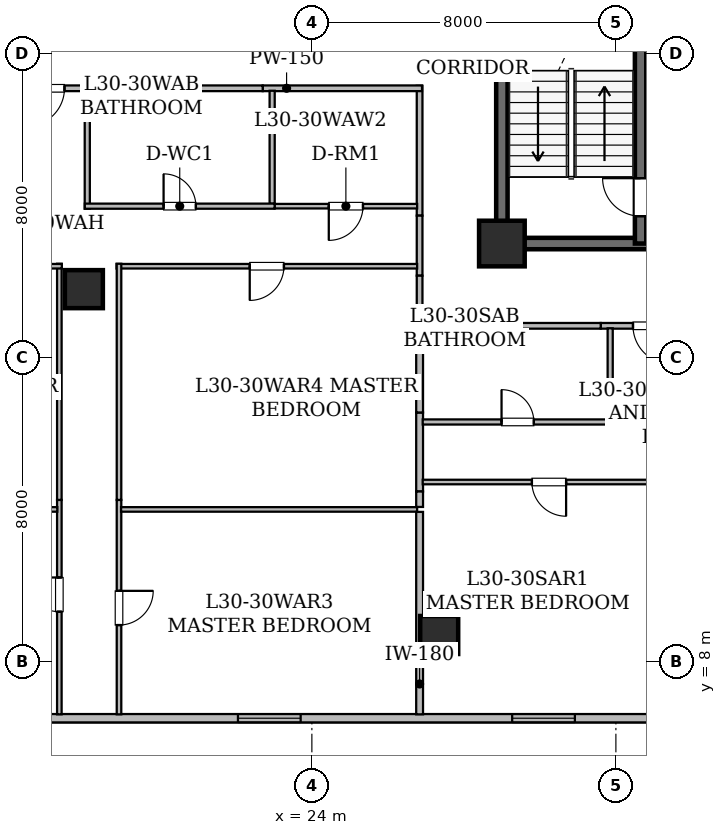
"""IFC4 building model, lengths in metres.
Left out: names, types, materials, properties, quantities, classifications, styles, units other than length and angle.
Written with IfcOpenShell. Run it as: python <this file> out.ifc"""

import sys

from ifc_helpers import new_model, si_unit, direction, frame, frame_2d, origin, origin_2d, place, context, subcontext, project, spatial, rectangle, hollow_rectangle, extrude, element, fill, save


model = new_model("IFC4")
c1 = context("Model", 3, precision=1e-05, world=origin(), true_north=direction((0.0, 1.0)))
c2 = subcontext(c1, "Body", "Model", "MODEL_VIEW")
j1 = project(units=[si_unit("LENGTHUNIT", "METRE"), si_unit("PLANEANGLEUNIT", "RADIAN")], contexts=[c1])
p1 = place(None, origin())
s1 = spatial("IfcSite", under=j1, at=p1, CompositionType="ELEMENT")
p2 = place(p1, origin())
s2 = spatial("IfcBuilding", under=s1, at=p2, CompositionType="ELEMENT")
p3 = place(p2, frame((0.0, 0.0, 120.15)))
s3 = spatial("IfcBuildingStorey", under=s2, at=p3, CompositionType="ELEMENT", Elevation=120.15)
p4 = place(p3, frame((29.0, 19.0, 0.0), z_axis=(0.0, 0.0, 1.0), x_axis=(1.0, 0.0, 0.0)))
e1 = element("IfcColumn", 1, at=p4, inside=s3, PredefinedType="COLUMN", context=c2, shape_type="SweptSolid", body=[
    extrude(hollow_rectangle(XDim=1.2, YDim=1.2, WallThickness=0.06, at=origin_2d()), origin(), (0.0, 0.0, 1.0), 3.65),
])
for number, where, z_axis, x_axis in (
    (2, (27.35, 8.7, 0.0), (0.0, 0.0, 1.0), (1.0, 0.0, 0.0)),
    (3, (18.0, 17.8, 0.0), (0.0, 0.0, 1.0), (1.0, 0.0, 0.0)),
):
    element("IfcColumn", number, at=place(p3, frame(where, z_axis=z_axis, x_axis=x_axis)), inside=s3, PredefinedType="COLUMN", context=c2, shape_type="SweptSolid", body=[
        extrude(hollow_rectangle(XDim=1.0, YDim=1.0, WallThickness=0.05, at=origin_2d()), origin(), (0.0, 0.0, 1.0), 3.65),
    ])
p5 = place(p3, frame((52.283, 6.51, 0.0), z_axis=(0.0, 0.0, 1.0), x_axis=(-1.0, 0.0, 0.0)))
e4 = element("IfcWall", 4, at=p5, inside=s3, PredefinedType="STANDARD", context=c2, shape_type="SweptSolid", body=[
    extrude(rectangle(XDim=38.568, YDim=0.22, at=frame_2d((19.284, 0.0))), origin(), (0.0, 0.0, 1.0), 3.43),
])
p6 = place(p5, frame((35.53, 0.0, 0.85)))
e5 = element("IfcOpeningElement", 5, at=p6, cuts=e4, PredefinedType="OPENING", context=c2, shape_type="SweptSolid", body=[
    extrude(rectangle(XDim=1.65, YDim=1.55, at=frame_2d((0.825, 0.775))), frame((0.0, 0.12, 0.0), z_axis=(0.0, -1.0, 0.0), x_axis=(1.0, 0.0, 0.0)), (0.0, 0.0, 1.0), 0.24),
])
p7 = place(p5, frame((28.578, 0.0, 0.85)))
e6 = element("IfcOpeningElement", 6, at=p7, cuts=e4, PredefinedType="OPENING", context=c2, shape_type="SweptSolid", body=[
    extrude(rectangle(XDim=1.65, YDim=1.55, at=frame_2d((0.825, 0.775))), frame((0.0, 0.12, 0.0), z_axis=(0.0, -1.0, 0.0), x_axis=(1.0, 0.0, 0.0)), (0.0, 0.0, 1.0), 0.24),
])
p8 = place(p5, frame((21.362, 0.0, 0.85)))
e7 = element("IfcOpeningElement", 7, at=p8, cuts=e4, PredefinedType="OPENING", context=c2, shape_type="SweptSolid", body=[
    extrude(rectangle(XDim=1.65, YDim=1.55, at=frame_2d((0.825, 0.775))), frame((0.0, 0.12, 0.0), z_axis=(0.0, -1.0, 0.0), x_axis=(1.0, 0.0, 0.0)), (0.0, 0.0, 1.0), 0.24),
])
p9 = place(p5, frame((14.097, 0.0, 0.85)))
e8 = element("IfcOpeningElement", 8, at=p9, cuts=e4, PredefinedType="OPENING", context=c2, shape_type="SweptSolid", body=[
    extrude(rectangle(XDim=1.65, YDim=1.55, at=frame_2d((0.825, 0.775))), frame((0.0, 0.12, 0.0), z_axis=(0.0, -1.0, 0.0), x_axis=(1.0, 0.0, 0.0)), (0.0, 0.0, 1.0), 0.24),
])
p10 = place(p5, frame((1.479, 0.0, 0.85)))
e9 = element("IfcOpeningElement", 9, at=p10, cuts=e4, PredefinedType="OPENING", context=c2, shape_type="SweptSolid", body=[
    extrude(rectangle(XDim=1.65, YDim=1.55, at=frame_2d((0.825, 0.775))), frame((0.0, 0.12, 0.0), z_axis=(0.0, -1.0, 0.0), x_axis=(1.0, 0.0, 0.0)), (0.0, 0.0, 1.0), 0.24),
])
p11 = place(p3, frame((29.0, 19.0, 0.0), z_axis=(0.0, 0.0, 1.0), x_axis=(0.0, 1.0, 0.0)))
e10 = element("IfcWall", 10, at=p11, inside=s3, PredefinedType="SHEAR", context=c2, shape_type="SweptSolid", body=[
    extrude(rectangle(XDim=9.0, YDim=0.3, at=frame_2d((4.5, 0.0))), origin(), (0.0, 0.0, 1.0), 3.43),
])
p12 = place(p3, frame((29.0, 19.0, 0.0), z_axis=(0.0, 0.0, 1.0), x_axis=(1.0, 0.0, 0.0)))
e11 = element("IfcWall", 11, at=p12, inside=s3, PredefinedType="SHEAR", context=c2, shape_type="SweptSolid", body=[
    extrude(rectangle(XDim=10.4, YDim=0.3, at=frame_2d((5.2, 0.0))), origin(), (0.0, 0.0, 1.0), 3.43),
])
p13 = place(p12, frame((4.9, 0.0, 0.0)))
e12 = element("IfcOpeningElement", 12, at=p13, cuts=e11, PredefinedType="OPENING", context=c2, shape_type="SweptSolid", body=[
    extrude(rectangle(XDim=1.2, YDim=2.15, at=frame_2d((0.6, 1.075))), frame((0.0, 0.16, 0.0), z_axis=(0.0, -1.0, 0.0), x_axis=(1.0, 0.0, 0.0)), (0.0, 0.0, 1.0), 0.32),
])
p14 = place(p3, frame((32.65, 19.0, 0.0), z_axis=(0.0, 0.0, 1.0), x_axis=(0.0, 1.0, 0.0)))
e13 = element("IfcWall", 13, at=p14, inside=s3, PredefinedType="SHEAR", context=c2, shape_type="SweptSolid", body=[
    extrude(rectangle(XDim=9.0, YDim=0.3, at=frame_2d((4.5, 0.0))), origin(), (0.0, 0.0, 1.0), 3.43),
])
p15 = place(p14, frame((0.72, 0.0, 0.0)))
e14 = element("IfcOpeningElement", 14, at=p15, cuts=e13, PredefinedType="OPENING", context=c2, shape_type="SweptSolid", body=[
    extrude(rectangle(XDim=1.0, YDim=2.15, at=frame_2d((0.5, 1.075))), frame((0.0, 0.16, 0.0), z_axis=(0.0, -1.0, 0.0), x_axis=(1.0, 0.0, 0.0)), (0.0, 0.0, 1.0), 0.32),
])
p16 = place(p3, frame((26.835, 19.734, 0.0), z_axis=(0.0, 0.0, 1.0), x_axis=(0.0, 1.0, 0.0)))
e15 = element("IfcWall", 15, at=p16, inside=s3, PredefinedType="STANDARD", context=c2, shape_type="SweptSolid", body=[
    extrude(rectangle(XDim=3.416, YDim=0.15, at=frame_2d((1.708, 0.0))), origin(), (0.0, 0.0, 1.0), 3.43),
])
p17 = place(p3, frame((26.898, 23.085, 0.0), z_axis=(0.0, 0.0, 1.0), x_axis=(-1.0, 0.0, 0.0)))
e16 = element("IfcWall", 16, at=p17, inside=s3, PredefinedType="STANDARD", context=c2, shape_type="SweptSolid", body=[
    extrude(rectangle(XDim=4.192, YDim=0.15, at=frame_2d((2.096, 0.0))), origin(), (0.0, 0.0, 1.0), 3.43),
])
p18 = place(p3, frame((26.835, 18.154, 0.0), z_axis=(0.0, 0.0, 1.0), x_axis=(0.0, 1.0, 0.0)))
e17 = element("IfcWall", 17, at=p18, inside=s3, PredefinedType="STANDARD", context=c2, shape_type="SweptSolid", body=[
    extrude(rectangle(XDim=1.58, YDim=0.15, at=frame_2d((0.79, 0.0))), origin(), (0.0, 0.0, 1.0), 2.647),
])
p19 = place(p3, frame((18.339, 23.085, 0.0), z_axis=(0.0, 0.0, 1.0), x_axis=(-1.0, 0.0, 0.0)))
e18 = element("IfcWall", 18, at=p19, inside=s3, PredefinedType="STANDARD", context=c2, shape_type="SweptSolid", body=[
    extrude(rectangle(XDim=2.698, YDim=0.15, at=frame_2d((1.349, 0.0))), origin(), (0.0, 0.0, 1.0), 2.647),
])
p20 = place(p19, frame((0.849, 0.0, 0.0)))
e19 = element("IfcOpeningElement", 19, at=p20, cuts=e18, PredefinedType="OPENING", context=c2, shape_type="SweptSolid", body=[
    extrude(rectangle(XDim=1.0, YDim=2.15, at=frame_2d((0.5, 1.075))), frame((0.0, 0.085, 0.0), z_axis=(0.0, -1.0, 0.0), x_axis=(1.0, 0.0, 0.0)), (0.0, 0.0, 1.0), 0.17),
])
p21 = place(p3, frame((22.706, 23.085, 0.0), z_axis=(0.0, 0.0, 1.0), x_axis=(-1.0, 0.0, 0.0)))
e20 = element("IfcWall", 20, at=p21, inside=s3, PredefinedType="STANDARD", context=c2, shape_type="SweptSolid", body=[
    extrude(rectangle(XDim=4.367, YDim=0.15, at=frame_2d((2.184, 0.0))), origin(), (0.0, 0.0, 1.0), 3.43),
])
p22 = place(p3, frame((26.835, 16.9, 0.0), z_axis=(0.0, 0.0, 1.0), x_axis=(0.0, 1.0, 0.0)))
e21 = element("IfcWall", 21, at=p22, inside=s3, PredefinedType="STANDARD", context=c2, shape_type="SweptSolid", body=[
    extrude(rectangle(XDim=1.254, YDim=0.15, at=frame_2d((0.627, 0.0))), origin(), (0.0, 0.0, 1.0), 3.43),
])
p23 = place(p3, frame((34.299, 16.835, 0.0), z_axis=(0.0, 0.0, 1.0), x_axis=(-1.0, 0.0, 0.0)))
e22 = element("IfcWall", 22, at=p23, inside=s3, PredefinedType="STANDARD", context=c2, shape_type="SweptSolid", body=[
    extrude(rectangle(XDim=2.698, YDim=0.15, at=frame_2d((1.349, 0.0))), origin(), (0.0, 0.0, 1.0), 3.43),
])
p24 = place(p23, frame((0.849, 0.0, 0.0)))
e23 = element("IfcOpeningElement", 23, at=p24, cuts=e22, PredefinedType="OPENING", context=c2, shape_type="SweptSolid", body=[
    extrude(rectangle(XDim=1.0, YDim=2.15, at=frame_2d((0.5, 1.075))), frame((0.0, 0.085, 0.0), z_axis=(0.0, -1.0, 0.0), x_axis=(1.0, 0.0, 0.0)), (0.0, 0.0, 1.0), 0.17),
])
p25 = place(p3, frame((31.601, 16.835, 0.0), z_axis=(0.0, 0.0, 1.0), x_axis=(-1.0, 0.0, 0.0)))
e24 = element("IfcWall", 24, at=p25, inside=s3, PredefinedType="STANDARD", context=c2, shape_type="SweptSolid", body=[
    extrude(rectangle(XDim=4.701, YDim=0.15, at=frame_2d((2.351, 0.0))), origin(), (0.0, 0.0, 1.0), 2.647),
])
p26 = place(p3, frame((26.77, 19.983, 0.0), z_axis=(0.0, 0.0, 1.0), x_axis=(-1.0, 0.0, 0.0)))
e25 = element("IfcWall", 25, at=p26, inside=s3, PredefinedType="PARTITIONING", context=c2, shape_type="SweptSolid", body=[
    extrude(rectangle(XDim=3.75, YDim=0.12, at=frame_2d((1.875, 0.0))), origin(), (0.0, 0.0, 1.0), 3.43),
])
p27 = place(p26, frame((1.425, 0.0, 0.0)))
e26 = element("IfcOpeningElement", 26, at=p27, cuts=e25, PredefinedType="OPENING", context=c2, shape_type="SweptSolid", body=[
    extrude(rectangle(XDim=0.9, YDim=2.1, at=frame_2d((0.45, 1.05))), frame((0.0, 0.07, 0.0), z_axis=(0.0, -1.0, 0.0), x_axis=(1.0, 0.0, 0.0)), (0.0, 0.0, 1.0), 0.14),
])
p28 = place(p3, frame((22.955, 20.048, 0.0), z_axis=(0.0, 0.0, 1.0), x_axis=(0.0, 1.0, 0.0)))
e27 = element("IfcWall", 27, at=p28, inside=s3, PredefinedType="PARTITIONING", context=c2, shape_type="SweptSolid", body=[
    extrude(rectangle(XDim=2.972, YDim=0.135, at=frame_2d((1.486, 0.0))), origin(), (0.0, 0.0, 1.0), 3.43),
])
p29 = place(p3, frame((18.09, 23.02, 0.0), z_axis=(0.0, 0.0, 1.0), x_axis=(0.0, -1.0, 0.0)))
e28 = element("IfcWall", 28, at=p29, inside=s3, PredefinedType="PARTITIONING", context=c2, shape_type="SweptSolid", body=[
    extrude(rectangle(XDim=3.102, YDim=0.135, at=frame_2d((1.551, 0.0))), origin(), (0.0, 0.0, 1.0), 2.647),
])
p30 = place(p3, frame((18.025, 19.983, 0.0), z_axis=(0.0, 0.0, 1.0), x_axis=(1.0, 0.0, 0.0)))
e29 = element("IfcWall", 29, at=p30, inside=s3, PredefinedType="PARTITIONING", context=c2, shape_type="SweptSolid", body=[
    extrude(rectangle(XDim=4.995, YDim=0.135, at=frame_2d((2.498, 0.0))), origin(), (0.0, 0.0, 1.0), 2.647),
])
p31 = place(p30, frame((2.073, 0.0, 0.0)))
e30 = element("IfcOpeningElement", 30, at=p31, cuts=e29, PredefinedType="OPENING", context=c2, shape_type="SweptSolid", body=[
    extrude(rectangle(XDim=0.85, YDim=2.1, at=frame_2d((0.425, 1.05))), frame((0.0, 0.077, 0.0), z_axis=(0.0, -1.0, 0.0), x_axis=(1.0, 0.0, 0.0)), (0.0, 0.0, 1.0), 0.155),
])
p32 = place(p3, frame((17.355, 6.612, 0.0), z_axis=(0.0, 0.0, 1.0), x_axis=(0.0, 1.0, 0.0)))
e31 = element("IfcWall", 31, at=p32, inside=s3, PredefinedType="PARTITIONING", context=c2, shape_type="SweptSolid", body=[
    extrude(rectangle(XDim=5.642, YDim=0.12, at=frame_2d((2.821, 0.0))), origin(), (0.0, 0.0, 1.0), 2.876),
])
p33 = place(p32, frame((2.701, 0.0, 0.0)))
e32 = element("IfcOpeningElement", 32, at=p33, cuts=e31, PredefinedType="OPENING", context=c2, shape_type="SweptSolid", body=[
    extrude(rectangle(XDim=0.9, YDim=2.1, at=frame_2d((0.45, 1.05))), frame((0.0, 0.07, 0.0), z_axis=(0.0, -1.0, 0.0), x_axis=(1.0, 0.0, 0.0)), (0.0, 0.0, 1.0), 0.14),
])
p34 = place(p3, frame((17.355, 12.254, 0.0), z_axis=(0.0, 0.0, 1.0), x_axis=(0.0, 1.0, 0.0)))
e33 = element("IfcWall", 33, at=p34, inside=s3, PredefinedType="PARTITIONING", context=c2, shape_type="SweptSolid", body=[
    extrude(rectangle(XDim=6.214, YDim=0.12, at=frame_2d((3.107, 0.0))), origin(), (0.0, 0.0, 1.0), 2.647),
])
p35 = place(p3, frame((17.42, 18.403, 0.0), z_axis=(0.0, 0.0, 1.0), x_axis=(-1.0, 0.0, 0.0)))
e34 = element("IfcWall", 34, at=p35, inside=s3, PredefinedType="PARTITIONING", context=c2, shape_type="SweptSolid", body=[
    extrude(rectangle(XDim=7.91, YDim=0.12, at=frame_2d((3.955, 0.0))), origin(), (0.0, 0.0, 1.0), 2.647),
])
p36 = place(p35, frame((3.505, 0.0, 0.0)))
e35 = element("IfcOpeningElement", 35, at=p36, cuts=e34, PredefinedType="OPENING", context=c2, shape_type="SweptSolid", body=[
    extrude(rectangle(XDim=0.9, YDim=2.1, at=frame_2d((0.45, 1.05))), frame((0.0, 0.07, 0.0), z_axis=(0.0, -1.0, 0.0), x_axis=(1.0, 0.0, 0.0)), (0.0, 0.0, 1.0), 0.14),
])
p37 = place(p3, frame((18.925, 12.254, 0.0), z_axis=(0.0, 0.0, 1.0), x_axis=(0.0, -1.0, 0.0)))
e36 = element("IfcWall", 36, at=p37, inside=s3, PredefinedType="PARTITIONING", context=c2, shape_type="SweptSolid", body=[
    extrude(rectangle(XDim=5.642, YDim=0.12, at=frame_2d((2.821, 0.0))), origin(), (0.0, 0.0, 1.0), 2.876),
])
p38 = place(p37, frame((2.393, 0.0, 0.0)))
e37 = element("IfcOpeningElement", 37, at=p38, cuts=e36, PredefinedType="OPENING", context=c2, shape_type="SweptSolid", body=[
    extrude(rectangle(XDim=0.9, YDim=2.1, at=frame_2d((0.45, 1.05))), frame((0.0, 0.07, 0.0), z_axis=(0.0, -1.0, 0.0), x_axis=(1.0, 0.0, 0.0)), (0.0, 0.0, 1.0), 0.14),
])
p39 = place(p3, frame((26.77, 18.403, 0.0), z_axis=(0.0, 0.0, 1.0), x_axis=(-1.0, 0.0, 0.0)))
e38 = element("IfcWall", 38, at=p39, inside=s3, PredefinedType="PARTITIONING", context=c2, shape_type="SweptSolid", body=[
    extrude(rectangle(XDim=7.91, YDim=0.12, at=frame_2d((3.955, 0.0))), origin(), (0.0, 0.0, 1.0), 2.647),
])
p40 = place(p39, frame((3.505, 0.0, 0.0)))
e39 = element("IfcOpeningElement", 39, at=p40, cuts=e38, PredefinedType="OPENING", context=c2, shape_type="SweptSolid", body=[
    extrude(rectangle(XDim=0.9, YDim=2.1, at=frame_2d((0.45, 1.05))), frame((0.0, 0.07, 0.0), z_axis=(0.0, -1.0, 0.0), x_axis=(1.0, 0.0, 0.0)), (0.0, 0.0, 1.0), 0.14),
])
p41 = place(p3, frame((18.925, 18.468, 0.0), z_axis=(0.0, 0.0, 1.0), x_axis=(0.0, -1.0, 0.0)))
e40 = element("IfcWall", 40, at=p41, inside=s3, PredefinedType="PARTITIONING", context=c2, shape_type="SweptSolid", body=[
    extrude(rectangle(XDim=6.214, YDim=0.12, at=frame_2d((3.107, 0.0))), origin(), (0.0, 0.0, 1.0), 2.647),
])
p42 = place(p3, frame((9.51, 12.004, 0.0), z_axis=(0.0, 0.0, 1.0), x_axis=(1.0, 0.0, 0.0)))
e41 = element("IfcWall", 41, at=p42, inside=s3, PredefinedType="PARTITIONING", context=c2, shape_type="SweptSolid", body=[
    extrude(rectangle(XDim=7.791, YDim=0.12, at=frame_2d((3.896, 0.0))), origin(), (0.0, 0.0, 1.0), 2.647),
])
p43 = place(p3, frame((18.979, 12.004, 0.0), z_axis=(0.0, 0.0, 1.0), x_axis=(1.0, 0.0, 0.0)))
e42 = element("IfcWall", 42, at=p43, inside=s3, PredefinedType="PARTITIONING", context=c2, shape_type="SweptSolid", body=[
    extrude(rectangle(XDim=7.791, YDim=0.12, at=frame_2d((3.896, 0.0))), origin(), (0.0, 0.0, 1.0), 3.43),
])
p44 = place(p3, frame((26.835, 11.939, 0.0), z_axis=(0.0, 0.0, 1.0), x_axis=(0.0, -1.0, 0.0)))
e43 = element("IfcWall", 43, at=p44, inside=s3, PredefinedType="STANDARD", context=c2, shape_type="SweptSolid", body=[
    extrude(rectangle(XDim=5.327, YDim=0.18, at=frame_2d((2.664, 0.0))), origin(), (0.0, 0.0, 1.0), 2.876),
])
p45 = place(p3, frame((26.835, 14.554, 0.0), z_axis=(0.0, 0.0, 1.0), x_axis=(0.0, -1.0, 0.0)))
e44 = element("IfcWall", 44, at=p45, inside=s3, PredefinedType="STANDARD", context=c2, shape_type="SweptSolid", body=[
    extrude(rectangle(XDim=2.078, YDim=0.18, at=frame_2d((1.039, 0.0))), origin(), (0.0, 0.0, 1.0), 3.43),
])
p46 = place(p3, frame((26.835, 16.9, 0.0), z_axis=(0.0, 0.0, 1.0), x_axis=(0.0, -1.0, 0.0)))
e45 = element("IfcWall", 45, at=p46, inside=s3, PredefinedType="STANDARD", context=c2, shape_type="SweptSolid", body=[
    extrude(rectangle(XDim=2.346, YDim=0.18, at=frame_2d((1.173, 0.0))), origin(), (0.0, 0.0, 1.0), 3.43),
])
p47 = place(p3, frame((26.835, 12.476, 0.0), z_axis=(0.0, 0.0, 1.0), x_axis=(0.0, -1.0, 0.0)))
e46 = element("IfcWall", 46, at=p47, inside=s3, PredefinedType="STANDARD", context=c2, shape_type="SweptSolid", body=[
    extrude(rectangle(XDim=0.407, YDim=0.18, at=frame_2d((0.204, 0.0))), origin(), (0.0, 0.0, 1.0), 3.43),
])
p48 = place(p3, frame((26.917, 14.305, 0.0), z_axis=(0.0, 0.0, 1.0), x_axis=(1.0, 0.0, 0.0)))
e47 = element("IfcWall", 47, at=p48, inside=s3, PredefinedType="PARTITIONING", context=c2, shape_type="SweptSolid", body=[
    extrude(rectangle(XDim=4.998, YDim=0.135, at=frame_2d((2.499, 0.0))), origin(), (0.0, 0.0, 1.0), 2.647),
])
p49 = place(p48, frame((2.074, 0.0, 0.0)))
e48 = element("IfcOpeningElement", 48, at=p49, cuts=e47, PredefinedType="OPENING", context=c2, shape_type="SweptSolid", body=[
    extrude(rectangle(XDim=0.85, YDim=2.1, at=frame_2d((0.425, 1.05))), frame((0.0, 0.077, 0.0), z_axis=(0.0, -1.0, 0.0), x_axis=(1.0, 0.0, 0.0)), (0.0, 0.0, 1.0), 0.155),
])
p50 = place(p3, frame((31.85, 14.24, 0.0), z_axis=(0.0, 0.0, 1.0), x_axis=(0.0, 1.0, 0.0)))
e49 = element("IfcWall", 49, at=p50, inside=s3, PredefinedType="PARTITIONING", context=c2, shape_type="SweptSolid", body=[
    extrude(rectangle(XDim=2.53, YDim=0.135, at=frame_2d((1.265, 0.0))), origin(), (0.0, 0.0, 1.0), 3.43),
])
p51 = place(p3, frame((33.607, 12.725, 0.0), z_axis=(0.0, 0.0, 1.0), x_axis=(-1.0, 0.0, 0.0)))
e50 = element("IfcWall", 50, at=p51, inside=s3, PredefinedType="PARTITIONING", context=c2, shape_type="SweptSolid", body=[
    extrude(rectangle(XDim=6.69, YDim=0.12, at=frame_2d((3.345, 0.0))), origin(), (0.0, 0.0, 1.0), 2.647),
])
p52 = place(p51, frame((2.917, 0.0, 0.0)))
e51 = element("IfcOpeningElement", 51, at=p52, cuts=e50, PredefinedType="OPENING", context=c2, shape_type="SweptSolid", body=[
    extrude(rectangle(XDim=0.9, YDim=2.1, at=frame_2d((0.45, 1.05))), frame((0.0, 0.07, 0.0), z_axis=(0.0, -1.0, 0.0), x_axis=(1.0, 0.0, 0.0)), (0.0, 0.0, 1.0), 0.14),
])
p53 = place(p7, origin())
e52 = element("IfcWindow", 52, at=p53, inside=s3, PartitioningType="SINGLE_PANEL", PredefinedType="WINDOW", context=c2, shape_type="SweptSolid", body=[
    extrude(rectangle(XDim=1.65, YDim=1.55, at=frame_2d((0.825, 0.775))), frame((0.0, 0.03, 0.0), z_axis=(0.0, -1.0, 0.0), x_axis=(1.0, 0.0, 0.0)), (0.0, 0.0, 1.0), 0.06),
])
fill(e6, e52)
p54 = place(p8, origin())
e53 = element("IfcWindow", 53, at=p54, inside=s3, PartitioningType="SINGLE_PANEL", PredefinedType="WINDOW", context=c2, shape_type="SweptSolid", body=[
    extrude(rectangle(XDim=1.65, YDim=1.55, at=frame_2d((0.825, 0.775))), frame((0.0, 0.03, 0.0), z_axis=(0.0, -1.0, 0.0), x_axis=(1.0, 0.0, 0.0)), (0.0, 0.0, 1.0), 0.06),
])
fill(e7, e53)
p55 = place(p15, origin())
e54 = element("IfcDoor", 54, at=p55, inside=s3, OperationType="SINGLE_SWING_RIGHT", PredefinedType="DOOR", context=c2, shape_type="SweptSolid", body=[
    extrude(rectangle(XDim=1.0, YDim=2.15, at=frame_2d((0.5, 1.075))), frame((0.0, 0.025, 0.0), z_axis=(0.0, -1.0, 0.0), x_axis=(1.0, 0.0, 0.0)), (0.0, 0.0, 1.0), 0.05),
])
fill(e14, e54)
p56 = place(p20, origin())
e55 = element("IfcDoor", 55, at=p56, inside=s3, OperationType="SINGLE_SWING_RIGHT", PredefinedType="DOOR", context=c2, shape_type="SweptSolid", body=[
    extrude(rectangle(XDim=1.0, YDim=2.15, at=frame_2d((0.5, 1.075))), frame((0.0, 0.025, 0.0), z_axis=(0.0, -1.0, 0.0), x_axis=(1.0, 0.0, 0.0)), (0.0, 0.0, 1.0), 0.05),
])
fill(e19, e55)
p57 = place(p24, origin())
e56 = element("IfcDoor", 56, at=p57, inside=s3, OperationType="SINGLE_SWING_LEFT", PredefinedType="DOOR", context=c2, shape_type="SweptSolid", body=[
    extrude(rectangle(XDim=1.0, YDim=2.15, at=frame_2d((0.5, 1.075))), frame((0.0, 0.025, 0.0), z_axis=(0.0, -1.0, 0.0), x_axis=(1.0, 0.0, 0.0)), (0.0, 0.0, 1.0), 0.05),
])
fill(e23, e56)
p58 = place(p27, origin())
e57 = element("IfcDoor", 57, at=p58, inside=s3, OperationType="SINGLE_SWING_RIGHT", PredefinedType="DOOR", context=c2, shape_type="SweptSolid", body=[
    extrude(rectangle(XDim=0.9, YDim=2.1, at=frame_2d((0.45, 1.05))), frame((0.0, 0.025, 0.0), z_axis=(0.0, -1.0, 0.0), x_axis=(1.0, 0.0, 0.0)), (0.0, 0.0, 1.0), 0.05),
])
fill(e26, e57)
p59 = place(p31, origin())
e58 = element("IfcDoor", 58, at=p59, inside=s3, OperationType="SINGLE_SWING_LEFT", PredefinedType="DOOR", context=c2, shape_type="SweptSolid", body=[
    extrude(rectangle(XDim=0.85, YDim=2.1, at=frame_2d((0.425, 1.05))), frame((0.0, 0.025, 0.0), z_axis=(0.0, -1.0, 0.0), x_axis=(1.0, 0.0, 0.0)), (0.0, 0.0, 1.0), 0.05),
])
fill(e30, e58)
p60 = place(p33, origin())
e59 = element("IfcDoor", 59, at=p60, inside=s3, OperationType="SINGLE_SWING_RIGHT", PredefinedType="DOOR", context=c2, shape_type="SweptSolid", body=[
    extrude(rectangle(XDim=0.9, YDim=2.1, at=frame_2d((0.45, 1.05))), frame((0.0, 0.025, 0.0), z_axis=(0.0, -1.0, 0.0), x_axis=(1.0, 0.0, 0.0)), (0.0, 0.0, 1.0), 0.05),
])
fill(e32, e59)
p61 = place(p38, origin())
e60 = element("IfcDoor", 60, at=p61, inside=s3, OperationType="SINGLE_SWING_LEFT", PredefinedType="DOOR", context=c2, shape_type="SweptSolid", body=[
    extrude(rectangle(XDim=0.9, YDim=2.1, at=frame_2d((0.45, 1.05))), frame((0.0, 0.025, 0.0), z_axis=(0.0, -1.0, 0.0), x_axis=(1.0, 0.0, 0.0)), (0.0, 0.0, 1.0), 0.05),
])
fill(e37, e60)
p62 = place(p40, origin())
e61 = element("IfcDoor", 61, at=p62, inside=s3, OperationType="SINGLE_SWING_RIGHT", PredefinedType="DOOR", context=c2, shape_type="SweptSolid", body=[
    extrude(rectangle(XDim=0.9, YDim=2.1, at=frame_2d((0.45, 1.05))), frame((0.0, 0.025, 0.0), z_axis=(0.0, -1.0, 0.0), x_axis=(1.0, 0.0, 0.0)), (0.0, 0.0, 1.0), 0.05),
])
fill(e39, e61)
p63 = place(p49, origin())
e62 = element("IfcDoor", 62, at=p63, inside=s3, OperationType="SINGLE_SWING_LEFT", PredefinedType="DOOR", context=c2, shape_type="SweptSolid", body=[
    extrude(rectangle(XDim=0.85, YDim=2.1, at=frame_2d((0.425, 1.05))), frame((0.0, 0.025, 0.0), z_axis=(0.0, -1.0, 0.0), x_axis=(1.0, 0.0, 0.0)), (0.0, 0.0, 1.0), 0.05),
])
fill(e48, e62)
p64 = place(p52, origin())
e63 = element("IfcDoor", 63, at=p64, inside=s3, OperationType="SINGLE_SWING_LEFT", PredefinedType="DOOR", context=c2, shape_type="SweptSolid", body=[
    extrude(rectangle(XDim=0.9, YDim=2.1, at=frame_2d((0.45, 1.05))), frame((0.0, 0.025, 0.0), z_axis=(0.0, -1.0, 0.0), x_axis=(1.0, 0.0, 0.0)), (0.0, 0.0, 1.0), 0.05),
])
fill(e51, e63)
save(model, sys.argv[1])
